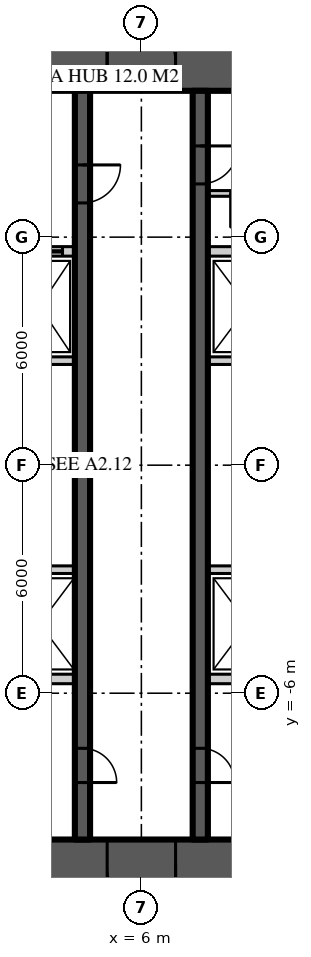
"""IFC4 building model, lengths in metres.
Left out: names, types, materials, properties, quantities, classifications, styles, units other than length and angle.
Written with IfcOpenShell. Run it as: python <this file> out.ifc"""

import sys

from ifc_helpers import new_model, si_unit, direction, frame, frame_2d, origin, place, context, subcontext, project, spatial, rectangle, extrude, element, fill, save


model = new_model("IFC4")
c1 = context("Model", 3, precision=1e-05, world=origin(), true_north=direction((0.0, 1.0)))
c2 = subcontext(c1, "Body", "Model", "MODEL_VIEW")
j1 = project(units=[si_unit("LENGTHUNIT", "METRE"), si_unit("PLANEANGLEUNIT", "RADIAN")], contexts=[c1])
p1 = place(None, origin())
s1 = spatial("IfcSite", under=j1, at=p1, CompositionType="ELEMENT")
p2 = place(p1, origin())
s2 = spatial("IfcBuilding", under=s1, at=p2, CompositionType="ELEMENT")
p3 = place(p2, frame((0.0, 0.0, 66.9)))
s3 = spatial("IfcBuildingStorey", under=s2, at=p3, CompositionType="ELEMENT", Elevation=66.9)
p4 = place(p3, frame((-11.15, 10.5, 0.0), z_axis=(0.0, 0.0, 1.0), x_axis=(1.0, 0.0, 0.0)))
e1 = element("IfcWall", 1, at=p4, inside=s3, PredefinedType="SHEAR", context=c2, shape_type="SweptSolid", body=[
    extrude(rectangle(XDim=22.3, YDim=1.3, at=frame_2d((11.15, 0.0))), origin(), (0.0, 0.0, 1.0), 3.9),
])
p5 = place(p4, frame((4.25, 0.0, 0.0)))
e2 = element("IfcOpeningElement", 2, at=p5, cuts=e1, PredefinedType="OPENING", context=c2, shape_type="SweptSolid", body=[
    extrude(rectangle(XDim=1.8, YDim=2.2, at=frame_2d((0.9, 1.1))), frame((0.0, 0.66, 0.0), z_axis=(0.0, -1.0, 0.0), x_axis=(1.0, 0.0, 0.0)), (0.0, 0.0, 1.0), 1.32),
])
p6 = place(p4, frame((16.25, 0.0, 0.0)))
e3 = element("IfcOpeningElement", 3, at=p6, cuts=e1, PredefinedType="OPENING", context=c2, shape_type="SweptSolid", body=[
    extrude(rectangle(XDim=1.8, YDim=2.2, at=frame_2d((0.9, 1.1))), frame((0.0, 0.66, 0.0), z_axis=(0.0, -1.0, 0.0), x_axis=(1.0, 0.0, 0.0)), (0.0, 0.0, 1.0), 1.32),
])
p7 = place(p3, frame((11.15, -10.5, 0.0), z_axis=(0.0, 0.0, 1.0), x_axis=(-1.0, 0.0, 0.0)))
e4 = element("IfcWall", 4, at=p7, inside=s3, PredefinedType="SHEAR", context=c2, shape_type="SweptSolid", body=[
    extrude(rectangle(XDim=22.3, YDim=1.3, at=frame_2d((11.15, 0.0))), origin(), (0.0, 0.0, 1.0), 3.9),
])
p8 = place(p7, frame((16.25, 0.0, 0.0)))
e5 = element("IfcOpeningElement", 5, at=p8, cuts=e4, PredefinedType="OPENING", context=c2, shape_type="SweptSolid", body=[
    extrude(rectangle(XDim=1.8, YDim=2.2, at=frame_2d((0.9, 1.1))), frame((0.0, 0.66, 0.0), z_axis=(0.0, -1.0, 0.0), x_axis=(1.0, 0.0, 0.0)), (0.0, 0.0, 1.0), 1.32),
])
p9 = place(p7, frame((4.25, 0.0, 0.0)))
e6 = element("IfcOpeningElement", 6, at=p9, cuts=e4, PredefinedType="OPENING", context=c2, shape_type="SweptSolid", body=[
    extrude(rectangle(XDim=1.8, YDim=2.2, at=frame_2d((0.9, 1.1))), frame((0.0, 0.66, 0.0), z_axis=(0.0, -1.0, 0.0), x_axis=(1.0, 0.0, 0.0)), (0.0, 0.0, 1.0), 1.32),
])
p10 = place(p3, frame((7.55, 9.85, 0.0), z_axis=(0.0, 0.0, 1.0), x_axis=(0.0, -1.0, 0.0)))
e7 = element("IfcWall", 7, at=p10, inside=s3, PredefinedType="SHEAR", context=c2, shape_type="SweptSolid", body=[
    extrude(rectangle(XDim=19.7, YDim=0.4, at=frame_2d((9.85, 0.0))), origin(), (0.0, 0.0, 1.0), 3.9),
])
p11 = place(p10, frame((1.45, 0.0, 0.0)))
e8 = element("IfcOpeningElement", 8, at=p11, cuts=e7, PredefinedType="OPENING", context=c2, shape_type="SweptSolid", body=[
    extrude(rectangle(XDim=1.0, YDim=2.2, at=frame_2d((0.5, 1.1))), frame((0.0, 0.21, 0.0), z_axis=(0.0, -1.0, 0.0), x_axis=(1.0, 0.0, 0.0)), (0.0, 0.0, 1.0), 0.42),
])
p12 = place(p10, frame((17.3, 0.0, 0.0)))
e9 = element("IfcOpeningElement", 9, at=p12, cuts=e7, PredefinedType="OPENING", context=c2, shape_type="SweptSolid", body=[
    extrude(rectangle(XDim=0.9, YDim=2.1, at=frame_2d((0.45, 1.05))), frame((0.0, 0.21, 0.0), z_axis=(0.0, -1.0, 0.0), x_axis=(1.0, 0.0, 0.0)), (0.0, 0.0, 1.0), 0.42),
])
p13 = place(p3, frame((4.45, 9.85, 0.0), z_axis=(0.0, 0.0, 1.0), x_axis=(0.0, -1.0, 0.0)))
e10 = element("IfcWall", 10, at=p13, inside=s3, PredefinedType="SHEAR", context=c2, shape_type="SweptSolid", body=[
    extrude(rectangle(XDim=19.7, YDim=0.4, at=frame_2d((9.85, 0.0))), origin(), (0.0, 0.0, 1.0), 3.9),
])
p14 = place(p13, frame((1.95, 0.0, 0.0)))
e11 = element("IfcOpeningElement", 11, at=p14, cuts=e10, PredefinedType="OPENING", context=c2, shape_type="SweptSolid", body=[
    extrude(rectangle(XDim=1.0, YDim=2.2, at=frame_2d((0.5, 1.1))), frame((0.0, 0.21, 0.0), z_axis=(0.0, -1.0, 0.0), x_axis=(1.0, 0.0, 0.0)), (0.0, 0.0, 1.0), 0.42),
])
p15 = place(p13, frame((17.3, 0.0, 0.0)))
e12 = element("IfcOpeningElement", 12, at=p15, cuts=e10, PredefinedType="OPENING", context=c2, shape_type="SweptSolid", body=[
    extrude(rectangle(XDim=0.9, YDim=2.1, at=frame_2d((0.45, 1.05))), frame((0.0, 0.21, 0.0), z_axis=(0.0, -1.0, 0.0), x_axis=(1.0, 0.0, 0.0)), (0.0, 0.0, 1.0), 0.42),
])
p16 = place(p3, frame((2.4, 5.625, 0.0), z_axis=(0.0, 0.0, 1.0), x_axis=(1.0, 0.0, 0.0)))
e13 = element("IfcWall", 13, at=p16, inside=s3, PredefinedType="SOLIDWALL", context=c2, shape_type="SweptSolid", body=[
    extrude(rectangle(XDim=1.85, YDim=0.25, at=frame_2d((0.925, 0.0))), origin(), (0.0, 0.0, 1.0), 3.7),
])
p17 = place(p16, frame((0.325, 0.0, 0.0)))
e14 = element("IfcOpeningElement", 14, at=p17, cuts=e13, PredefinedType="OPENING", context=c2, shape_type="SweptSolid", body=[
    extrude(rectangle(XDim=1.2, YDim=2.2, at=frame_2d((0.6, 1.1))), frame((0.0, 0.135, 0.0), z_axis=(0.0, -1.0, 0.0), x_axis=(1.0, 0.0, 0.0)), (0.0, 0.0, 1.0), 0.27),
])
p18 = place(p3, frame((7.75, 5.625, 0.0), z_axis=(0.0, 0.0, 1.0), x_axis=(1.0, 0.0, 0.0)))
e15 = element("IfcWall", 15, at=p18, inside=s3, PredefinedType="SOLIDWALL", context=c2, shape_type="SweptSolid", body=[
    extrude(rectangle(XDim=2.1, YDim=0.25, at=frame_2d((1.05, 0.0))), origin(), (0.0, 0.0, 1.0), 3.7),
])
p19 = place(p3, frame((2.4, -5.625, 0.0), z_axis=(0.0, 0.0, 1.0), x_axis=(1.0, 0.0, 0.0)))
e16 = element("IfcWall", 16, at=p19, inside=s3, PredefinedType="SOLIDWALL", context=c2, shape_type="SweptSolid", body=[
    extrude(rectangle(XDim=1.85, YDim=0.25, at=frame_2d((0.925, 0.0))), origin(), (0.0, 0.0, 1.0), 3.7),
])
p20 = place(p3, frame((7.75, -5.625, 0.0), z_axis=(0.0, 0.0, 1.0), x_axis=(1.0, 0.0, 0.0)))
e17 = element("IfcWall", 17, at=p20, inside=s3, PredefinedType="SOLIDWALL", context=c2, shape_type="SweptSolid", body=[
    extrude(rectangle(XDim=2.1, YDim=0.25, at=frame_2d((1.05, 0.0))), origin(), (0.0, 0.0, 1.0), 3.7),
])
p21 = place(p3, frame((2.4, -2.75, 0.0), z_axis=(0.0, 0.0, 1.0), x_axis=(1.0, 0.0, 0.0)))
e18 = element("IfcWall", 18, at=p21, inside=s3, PredefinedType="SOLIDWALL", context=c2, shape_type="SweptSolid", body=[
    extrude(rectangle(XDim=1.85, YDim=0.2, at=frame_2d((0.925, 0.0))), origin(), (0.0, 0.0, 1.0), 3.7),
])
p22 = place(p3, frame((7.75, -2.75, 0.0), z_axis=(0.0, 0.0, 1.0), x_axis=(1.0, 0.0, 0.0)))
e19 = element("IfcWall", 19, at=p22, inside=s3, PredefinedType="SOLIDWALL", context=c2, shape_type="SweptSolid", body=[
    extrude(rectangle(XDim=2.1, YDim=0.2, at=frame_2d((1.05, 0.0))), origin(), (0.0, 0.0, 1.0), 3.7),
])
p23 = place(p3, frame((2.4, 2.75, 0.0), z_axis=(0.0, 0.0, 1.0), x_axis=(1.0, 0.0, 0.0)))
e20 = element("IfcWall", 20, at=p23, inside=s3, PredefinedType="SOLIDWALL", context=c2, shape_type="SweptSolid", body=[
    extrude(rectangle(XDim=1.85, YDim=0.2, at=frame_2d((0.925, 0.0))), origin(), (0.0, 0.0, 1.0), 3.7),
])
p24 = place(p3, frame((7.75, 2.75, 0.0), z_axis=(0.0, 0.0, 1.0), x_axis=(1.0, 0.0, 0.0)))
e21 = element("IfcWall", 21, at=p24, inside=s3, PredefinedType="SOLIDWALL", context=c2, shape_type="SweptSolid", body=[
    extrude(rectangle(XDim=2.1, YDim=0.2, at=frame_2d((1.05, 0.0))), origin(), (0.0, 0.0, 1.0), 3.7),
])
p25 = place(p3, frame((9.85, 7.15, 0.0), z_axis=(0.0, 0.0, 1.0), x_axis=(-1.0, 0.0, 0.0)))
e22 = element("IfcWall", 22, at=p25, inside=s3, PredefinedType="SOLIDWALL", context=c2, shape_type="SweptSolid", body=[
    extrude(rectangle(XDim=2.1, YDim=0.15, at=frame_2d((1.05, 0.0))), origin(), (0.0, 0.0, 1.0), 3.77),
])
p26 = place(p25, frame((0.6, 0.0, 0.0)))
e23 = element("IfcOpeningElement", 23, at=p26, cuts=e22, PredefinedType="OPENING", context=c2, shape_type="SweptSolid", body=[
    extrude(rectangle(XDim=0.9, YDim=2.1, at=frame_2d((0.45, 1.05))), frame((0.0, 0.085, 0.0), z_axis=(0.0, -1.0, 0.0), x_axis=(1.0, 0.0, 0.0)), (0.0, 0.0, 1.0), 0.17),
])
p27 = place(p6, origin())
e24 = element("IfcDoor", 24, at=p27, inside=s3, OperationType="DOUBLE_DOOR_DOUBLE_SWING", PredefinedType="DOOR", context=c2, shape_type="SweptSolid", body=[
    extrude(rectangle(XDim=1.8, YDim=2.2, at=frame_2d((0.9, 1.1))), frame((0.0, 0.025, 0.0), z_axis=(0.0, -1.0, 0.0), x_axis=(1.0, 0.0, 0.0)), (0.0, 0.0, 1.0), 0.05),
])
fill(e3, e24)
p28 = place(p9, origin())
e25 = element("IfcDoor", 25, at=p28, inside=s3, OperationType="DOUBLE_DOOR_DOUBLE_SWING", PredefinedType="DOOR", context=c2, shape_type="SweptSolid", body=[
    extrude(rectangle(XDim=1.8, YDim=2.2, at=frame_2d((0.9, 1.1))), frame((0.0, 0.025, 0.0), z_axis=(0.0, -1.0, 0.0), x_axis=(1.0, 0.0, 0.0)), (0.0, 0.0, 1.0), 0.05),
])
fill(e6, e25)
p29 = place(p11, origin())
e26 = element("IfcDoor", 26, at=p29, inside=s3, OperationType="SINGLE_SWING_LEFT", PredefinedType="DOOR", context=c2, shape_type="SweptSolid", body=[
    extrude(rectangle(XDim=1.0, YDim=2.2, at=frame_2d((0.5, 1.1))), frame((0.0, 0.025, 0.0), z_axis=(0.0, -1.0, 0.0), x_axis=(1.0, 0.0, 0.0)), (0.0, 0.0, 1.0), 0.05),
])
fill(e8, e26)
p30 = place(p14, origin())
e27 = element("IfcDoor", 27, at=p30, inside=s3, OperationType="SINGLE_SWING_LEFT", PredefinedType="DOOR", context=c2, shape_type="SweptSolid", body=[
    extrude(rectangle(XDim=1.0, YDim=2.2, at=frame_2d((0.5, 1.1))), frame((0.0, 0.025, 0.0), z_axis=(0.0, -1.0, 0.0), x_axis=(1.0, 0.0, 0.0)), (0.0, 0.0, 1.0), 0.05),
])
fill(e11, e27)
p31 = place(p12, origin())
e28 = element("IfcDoor", 28, at=p31, inside=s3, OperationType="SINGLE_SWING_RIGHT", PredefinedType="DOOR", context=c2, shape_type="SweptSolid", body=[
    extrude(rectangle(XDim=0.9, YDim=2.1, at=frame_2d((0.45, 1.05))), frame((0.0, 0.025, 0.0), z_axis=(0.0, -1.0, 0.0), x_axis=(1.0, 0.0, 0.0)), (0.0, 0.0, 1.0), 0.05),
])
fill(e9, e28)
p32 = place(p15, origin())
e29 = element("IfcDoor", 29, at=p32, inside=s3, OperationType="SINGLE_SWING_RIGHT", PredefinedType="DOOR", context=c2, shape_type="SweptSolid", body=[
    extrude(rectangle(XDim=0.9, YDim=2.1, at=frame_2d((0.45, 1.05))), frame((0.0, 0.025, 0.0), z_axis=(0.0, -1.0, 0.0), x_axis=(1.0, 0.0, 0.0)), (0.0, 0.0, 1.0), 0.05),
])
fill(e12, e29)
p33 = place(p17, origin())
e30 = element("IfcDoor", 30, at=p33, inside=s3, OperationType="SLIDING_TO_LEFT", PredefinedType="DOOR", context=c2, shape_type="SweptSolid", body=[
    extrude(rectangle(XDim=1.2, YDim=2.2, at=frame_2d((0.6, 1.1))), frame((0.0, 0.025, 0.0), z_axis=(0.0, -1.0, 0.0), x_axis=(1.0, 0.0, 0.0)), (0.0, 0.0, 1.0), 0.05),
])
fill(e14, e30)
save(model, sys.argv[1])
